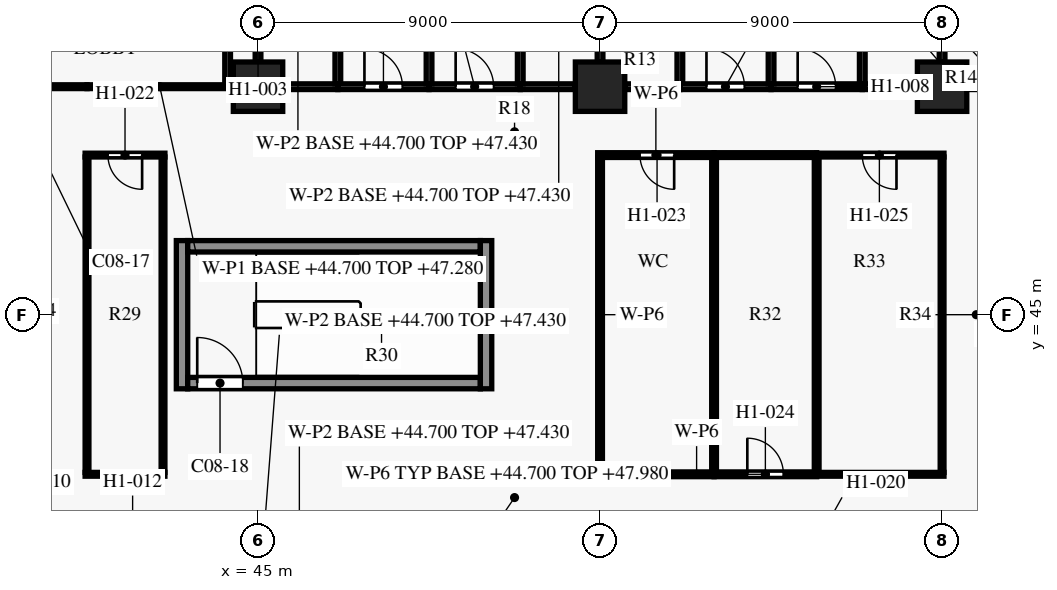
"""IFC4 building model, lengths in metres.
Left out: names, types, materials, properties, quantities, classifications, styles, units other than length and angle.
Written with IfcOpenShell. Run it as: python <this file> out.ifc"""

import sys

from ifc_helpers import new_model, si_unit, direction, frame, frame_2d, origin, origin_2d, place, context, subcontext, project, spatial, rectangle, extrude, element, fill, save


model = new_model("IFC4")
c1 = context("Model", 3, precision=1e-05, world=origin(), true_north=direction((0.0, 1.0)))
c2 = subcontext(c1, "Body", "Model", "MODEL_VIEW")
j1 = project(units=[si_unit("LENGTHUNIT", "METRE"), si_unit("PLANEANGLEUNIT", "RADIAN")], contexts=[c1])
p1 = place(None, origin())
s1 = spatial("IfcSite", under=j1, at=p1, CompositionType="ELEMENT")
p2 = place(p1, origin())
s2 = spatial("IfcBuilding", under=s1, at=p2, CompositionType="ELEMENT")
p3 = place(p2, frame((0.0, 0.0, 44.7)))
s3 = spatial("IfcBuildingStorey", under=s2, at=p3, CompositionType="ELEMENT", Elevation=44.7)
for number, where, z_axis, x_axis in (
    (1, (45.0, 51.0, 0.0), (0.0, 0.0, 1.0), (1.0, 0.0, 0.0)),
    (2, (54.0, 51.0, 0.0), (0.0, 0.0, 1.0), (1.0, 0.0, 0.0)),
    (3, (63.0, 51.0, 0.0), (0.0, 0.0, 1.0), (1.0, 0.0, 0.0)),
):
    element("IfcColumn", number, at=place(p3, frame(where, z_axis=z_axis, x_axis=x_axis)), inside=s3, PredefinedType="COLUMN", context=c2, shape_type="SweptSolid", body=[
        extrude(rectangle(XDim=1.3, YDim=1.3, at=origin_2d()), origin(), (0.0, 0.0, 1.0), 3.6),
    ])
p4 = place(p3, frame((43.15, 43.2, 0.0), z_axis=(0.0, 0.0, 1.0), x_axis=(1.0, 0.0, 0.0)))
e4 = element("IfcWall", 4, at=p4, inside=s3, PredefinedType="SHEAR", context=c2, shape_type="SweptSolid", body=[
    extrude(rectangle(XDim=7.7, YDim=0.3, at=frame_2d((3.85, 0.0))), origin(), (0.0, 0.0, 1.0), 3.3),
])
p5 = place(p4, frame((0.25, 0.0, 0.0)))
e5 = element("IfcOpeningElement", 5, at=p5, cuts=e4, PredefinedType="OPENING", context=c2, shape_type="SweptSolid", body=[
    extrude(rectangle(XDim=1.2, YDim=2.2, at=frame_2d((0.6, 1.1))), frame((0.0, 0.16, 0.0), z_axis=(0.0, -1.0, 0.0), x_axis=(1.0, 0.0, 0.0)), (0.0, 0.0, 1.0), 0.32),
])
p6 = place(p3, frame((43.15, 46.8, 0.0), z_axis=(0.0, 0.0, 1.0), x_axis=(1.0, 0.0, 0.0)))
e6 = element("IfcWall", 6, at=p6, inside=s3, PredefinedType="SHEAR", context=c2, shape_type="SweptSolid", body=[
    extrude(rectangle(XDim=7.7, YDim=0.3, at=frame_2d((3.85, 0.0))), origin(), (0.0, 0.0, 1.0), 3.3),
])
for number, where, z_axis, x_axis in (
    (7, (43.0, 43.05, 0.0), (0.0, 0.0, 1.0), (0.0, 1.0, 0.0)),
    (8, (51.0, 43.05, 0.0), (0.0, 0.0, 1.0), (0.0, 1.0, 0.0)),
):
    element("IfcWall", number, at=place(p3, frame(where, z_axis=z_axis, x_axis=x_axis)), inside=s3, PredefinedType="SHEAR", context=c2, shape_type="SweptSolid", body=[
        extrude(rectangle(XDim=3.9, YDim=0.3, at=frame_2d((1.95, 0.0))), origin(), (0.0, 0.0, 1.0), 3.3),
    ])
p7 = place(p3, frame((40.45, 40.8, 0.0), z_axis=(0.0, 0.0, 1.0), x_axis=(1.0, 0.0, 0.0)))
e9 = element("IfcWall", 9, at=p7, inside=s3, PredefinedType="PARTITIONING", context=c2, shape_type="SweptSolid", body=[
    extrude(rectangle(XDim=2.1, YDim=0.1, at=frame_2d((1.05, 0.0))), origin(), (0.0, 0.0, 1.0), 3.28),
])
p8 = place(p3, frame((53.938, 40.8, 0.0), z_axis=(0.0, 0.0, 1.0), x_axis=(1.0, 0.0, 0.0)))
e10 = element("IfcWall", 10, at=p8, inside=s3, PredefinedType="PARTITIONING", context=c2, shape_type="SweptSolid", body=[
    extrude(rectangle(XDim=3.062, YDim=0.125, at=frame_2d((1.531, 0.0))), origin(), (0.0, 0.0, 1.0), 2.73),
])
p9 = place(p3, frame((57.0, 40.8, 0.0), z_axis=(0.0, 0.0, 1.0), x_axis=(1.0, 0.0, 0.0)))
e11 = element("IfcWall", 11, at=p9, inside=s3, PredefinedType="PARTITIONING", context=c2, shape_type="SweptSolid", body=[
    extrude(rectangle(XDim=2.7, YDim=0.125, at=frame_2d((1.35, 0.0))), origin(), (0.0, 0.0, 1.0), 3.28),
])
p10 = place(p9, frame((0.875, 0.0, 0.0)))
e12 = element("IfcOpeningElement", 12, at=p10, cuts=e11, PredefinedType="OPENING", context=c2, shape_type="SweptSolid", body=[
    extrude(rectangle(XDim=0.95, YDim=2.1, at=frame_2d((0.475, 1.05))), frame((0.0, 0.073, 0.0), z_axis=(0.0, -1.0, 0.0), x_axis=(1.0, 0.0, 0.0)), (0.0, 0.0, 1.0), 0.145),
])
p11 = place(p3, frame((59.7, 40.8, 0.0), z_axis=(0.0, 0.0, 1.0), x_axis=(1.0, 0.0, 0.0)))
e13 = element("IfcWall", 13, at=p11, inside=s3, PredefinedType="PARTITIONING", context=c2, shape_type="SweptSolid", body=[
    extrude(rectangle(XDim=3.35, YDim=0.1, at=frame_2d((1.675, 0.0))), origin(), (0.0, 0.0, 1.0), 2.73),
])
p12 = place(p3, frame((63.0, 40.85, 0.0), z_axis=(0.0, 0.0, 1.0), x_axis=(0.0, 1.0, 0.0)))
e14 = element("IfcWall", 14, at=p12, inside=s3, PredefinedType="PARTITIONING", context=c2, shape_type="SweptSolid", body=[
    extrude(rectangle(XDim=8.3, YDim=0.1, at=frame_2d((4.15, 0.0))), origin(), (0.0, 0.0, 1.0), 2.73),
])
p13 = place(p3, frame((54.0, 49.137, 0.0), z_axis=(0.0, 0.0, 1.0), x_axis=(0.0, -1.0, 0.0)))
e15 = element("IfcWall", 15, at=p13, inside=s3, PredefinedType="PARTITIONING", context=c2, shape_type="SweptSolid", body=[
    extrude(rectangle(XDim=8.275, YDim=0.125, at=frame_2d((4.137, 0.0))), origin(), (0.0, 0.0, 1.0), 2.73),
])
for number, where, z_axis, x_axis in (
    (16, (57.0, 49.137, 0.0), (0.0, 0.0, 1.0), (0.0, -1.0, 0.0)),
    (17, (59.7, 49.137, 0.0), (0.0, 0.0, 1.0), (0.0, -1.0, 0.0)),
):
    element("IfcWall", number, at=place(p3, frame(where, z_axis=z_axis, x_axis=x_axis)), inside=s3, PredefinedType="PARTITIONING", context=c2, shape_type="SweptSolid", body=[
        extrude(rectangle(XDim=8.275, YDim=0.125, at=frame_2d((4.137, 0.0))), origin(), (0.0, 0.0, 1.0), 3.28),
    ])
for number, where, z_axis, x_axis in (
    (18, (40.5, 49.15, 0.0), (0.0, 0.0, 1.0), (0.0, -1.0, 0.0)),
    (19, (42.5, 49.15, 0.0), (0.0, 0.0, 1.0), (0.0, -1.0, 0.0)),
):
    element("IfcWall", number, at=place(p3, frame(where, z_axis=z_axis, x_axis=x_axis)), inside=s3, PredefinedType="PARTITIONING", context=c2, shape_type="SweptSolid", body=[
        extrude(rectangle(XDim=8.3, YDim=0.1, at=frame_2d((4.15, 0.0))), origin(), (0.0, 0.0, 1.0), 3.28),
    ])
p14 = place(p3, frame((42.55, 49.2, 0.0), z_axis=(0.0, 0.0, 1.0), x_axis=(-1.0, 0.0, 0.0)))
e20 = element("IfcWall", 20, at=p14, inside=s3, PredefinedType="PARTITIONING", context=c2, shape_type="SweptSolid", body=[
    extrude(rectangle(XDim=2.1, YDim=0.1, at=frame_2d((1.05, 0.0))), origin(), (0.0, 0.0, 1.0), 3.28),
])
p15 = place(p14, frame((0.6, 0.0, 0.0)))
e21 = element("IfcOpeningElement", 21, at=p15, cuts=e20, PredefinedType="OPENING", context=c2, shape_type="SweptSolid", body=[
    extrude(rectangle(XDim=0.9, YDim=2.1, at=frame_2d((0.45, 1.05))), frame((0.0, 0.06, 0.0), z_axis=(0.0, -1.0, 0.0), x_axis=(1.0, 0.0, 0.0)), (0.0, 0.0, 1.0), 0.12),
])
p16 = place(p3, frame((57.0, 49.2, 0.0), z_axis=(0.0, 0.0, 1.0), x_axis=(-1.0, 0.0, 0.0)))
e22 = element("IfcWall", 22, at=p16, inside=s3, PredefinedType="PARTITIONING", context=c2, shape_type="SweptSolid", body=[
    extrude(rectangle(XDim=3.062, YDim=0.125, at=frame_2d((1.531, 0.0))), origin(), (0.0, 0.0, 1.0), 2.73),
])
p17 = place(p16, frame((1.05, 0.0, 0.0)))
e23 = element("IfcOpeningElement", 23, at=p17, cuts=e22, PredefinedType="OPENING", context=c2, shape_type="SweptSolid", body=[
    extrude(rectangle(XDim=0.9, YDim=2.1, at=frame_2d((0.45, 1.05))), frame((0.0, 0.073, 0.0), z_axis=(0.0, -1.0, 0.0), x_axis=(1.0, 0.0, 0.0)), (0.0, 0.0, 1.0), 0.145),
])
p18 = place(p3, frame((59.7, 49.2, 0.0), z_axis=(0.0, 0.0, 1.0), x_axis=(-1.0, 0.0, 0.0)))
e24 = element("IfcWall", 24, at=p18, inside=s3, PredefinedType="PARTITIONING", context=c2, shape_type="SweptSolid", body=[
    extrude(rectangle(XDim=2.7, YDim=0.125, at=frame_2d((1.35, 0.0))), origin(), (0.0, 0.0, 1.0), 3.28),
])
p19 = place(p3, frame((63.05, 49.2, 0.0), z_axis=(0.0, 0.0, 1.0), x_axis=(-1.0, 0.0, 0.0)))
e25 = element("IfcWall", 25, at=p19, inside=s3, PredefinedType="PARTITIONING", context=c2, shape_type="SweptSolid", body=[
    extrude(rectangle(XDim=3.35, YDim=0.1, at=frame_2d((1.675, 0.0))), origin(), (0.0, 0.0, 1.0), 2.73),
])
p20 = place(p19, frame((1.25, 0.0, 0.0)))
e26 = element("IfcOpeningElement", 26, at=p20, cuts=e25, PredefinedType="OPENING", context=c2, shape_type="SweptSolid", body=[
    extrude(rectangle(XDim=0.9, YDim=2.1, at=frame_2d((0.45, 1.05))), frame((0.0, 0.06, 0.0), z_axis=(0.0, -1.0, 0.0), x_axis=(1.0, 0.0, 0.0)), (0.0, 0.0, 1.0), 0.12),
])
p21 = place(p3, frame((40.5, 51.0, 0.0), z_axis=(0.0, 0.0, 1.0), x_axis=(-1.0, 0.0, 0.0)))
e27 = element("IfcWall", 27, at=p21, inside=s3, PredefinedType="PARTITIONING", context=c2, shape_type="SweptSolid", body=[
    extrude(rectangle(XDim=3.845, YDim=0.1, at=frame_2d((1.922, 0.0))), origin(), (0.0, 0.0, 1.0), 2.58),
])
p22 = place(p21, frame((1.8, 0.0, 0.0)))
e28 = element("IfcOpeningElement", 28, at=p22, cuts=e27, PredefinedType="OPENING", context=c2, shape_type="SweptSolid", body=[
    extrude(rectangle(XDim=0.9, YDim=2.1, at=frame_2d((0.45, 1.05))), frame((0.0, 0.06, 0.0), z_axis=(0.0, -1.0, 0.0), x_axis=(1.0, 0.0, 0.0)), (0.0, 0.0, 1.0), 0.12),
])
p23 = place(p3, frame((44.33, 51.0, 0.0), z_axis=(0.0, 0.0, 1.0), x_axis=(-1.0, 0.0, 0.0)))
e29 = element("IfcWall", 29, at=p23, inside=s3, PredefinedType="PARTITIONING", context=c2, shape_type="SweptSolid", body=[
    extrude(rectangle(XDim=3.83, YDim=0.1, at=frame_2d((1.915, 0.0))), origin(), (0.0, 0.0, 1.0), 2.58),
])
p24 = place(p3, frame((45.655, 51.0, 0.0), z_axis=(0.0, 0.0, 1.0), x_axis=(1.0, 0.0, 0.0)))
e30 = element("IfcWall", 30, at=p24, inside=s3, PredefinedType="PARTITIONING", context=c2, shape_type="SweptSolid", body=[
    extrude(rectangle(XDim=1.445, YDim=0.15, at=frame_2d((0.723, 0.0))), origin(), (0.0, 0.0, 1.0), 2.58),
])
p25 = place(p3, frame((47.1, 51.0, 0.0), z_axis=(0.0, 0.0, 1.0), x_axis=(1.0, 0.0, 0.0)))
e31 = element("IfcWall", 31, at=p25, inside=s3, PredefinedType="PARTITIONING", context=c2, shape_type="SweptSolid", body=[
    extrude(rectangle(XDim=2.4, YDim=0.15, at=frame_2d((1.2, 0.0))), origin(), (0.0, 0.0, 1.0), 2.58),
])
p26 = place(p25, frame((0.7, 0.0, 0.0)))
e32 = element("IfcOpeningElement", 32, at=p26, cuts=e31, PredefinedType="OPENING", context=c2, shape_type="SweptSolid", body=[
    extrude(rectangle(XDim=1.0, YDim=2.1, at=frame_2d((0.5, 1.05))), frame((0.0, 0.085, 0.0), z_axis=(0.0, -1.0, 0.0), x_axis=(1.0, 0.0, 0.0)), (0.0, 0.0, 1.0), 0.17),
])
p27 = place(p3, frame((49.5, 51.0, 0.0), z_axis=(0.0, 0.0, 1.0), x_axis=(1.0, 0.0, 0.0)))
e33 = element("IfcWall", 33, at=p27, inside=s3, PredefinedType="PARTITIONING", context=c2, shape_type="SweptSolid", body=[
    extrude(rectangle(XDim=2.4, YDim=0.15, at=frame_2d((1.2, 0.0))), origin(), (0.0, 0.0, 1.0), 2.58),
])
p28 = place(p27, frame((0.7, 0.0, 0.0)))
e34 = element("IfcOpeningElement", 34, at=p28, cuts=e33, PredefinedType="OPENING", context=c2, shape_type="SweptSolid", body=[
    extrude(rectangle(XDim=1.0, YDim=2.1, at=frame_2d((0.5, 1.05))), frame((0.0, 0.085, 0.0), z_axis=(0.0, -1.0, 0.0), x_axis=(1.0, 0.0, 0.0)), (0.0, 0.0, 1.0), 0.17),
])
for number, where, z_axis, x_axis in (
    (35, (51.9, 51.0, 0.0), (0.0, 0.0, 1.0), (1.0, 0.0, 0.0)),
    (36, (54.655, 51.0, 0.0), (0.0, 0.0, 1.0), (1.0, 0.0, 0.0)),
):
    element("IfcWall", number, at=place(p3, frame(where, z_axis=z_axis, x_axis=x_axis)), inside=s3, PredefinedType="PARTITIONING", context=c2, shape_type="SweptSolid", body=[
        extrude(rectangle(XDim=1.445, YDim=0.15, at=frame_2d((0.723, 0.0))), origin(), (0.0, 0.0, 1.0), 2.58),
    ])
p29 = place(p3, frame((56.1, 51.0, 0.0), z_axis=(0.0, 0.0, 1.0), x_axis=(1.0, 0.0, 0.0)))
e37 = element("IfcWall", 37, at=p29, inside=s3, PredefinedType="PARTITIONING", context=c2, shape_type="SweptSolid", body=[
    extrude(rectangle(XDim=2.4, YDim=0.15, at=frame_2d((1.2, 0.0))), origin(), (0.0, 0.0, 1.0), 2.58),
])
p30 = place(p29, frame((0.7, 0.0, 0.0)))
e38 = element("IfcOpeningElement", 38, at=p30, cuts=e37, PredefinedType="OPENING", context=c2, shape_type="SweptSolid", body=[
    extrude(rectangle(XDim=1.0, YDim=2.1, at=frame_2d((0.5, 1.05))), frame((0.0, 0.085, 0.0), z_axis=(0.0, -1.0, 0.0), x_axis=(1.0, 0.0, 0.0)), (0.0, 0.0, 1.0), 0.17),
])
p31 = place(p3, frame((58.5, 51.0, 0.0), z_axis=(0.0, 0.0, 1.0), x_axis=(1.0, 0.0, 0.0)))
e39 = element("IfcWall", 39, at=p31, inside=s3, PredefinedType="PARTITIONING", context=c2, shape_type="SweptSolid", body=[
    extrude(rectangle(XDim=2.4, YDim=0.15, at=frame_2d((1.2, 0.0))), origin(), (0.0, 0.0, 1.0), 2.58),
])
p32 = place(p31, frame((0.7, 0.0, 0.0)))
e40 = element("IfcOpeningElement", 40, at=p32, cuts=e39, PredefinedType="OPENING", context=c2, shape_type="SweptSolid", body=[
    extrude(rectangle(XDim=1.0, YDim=2.1, at=frame_2d((0.5, 1.05))), frame((0.0, 0.085, 0.0), z_axis=(0.0, -1.0, 0.0), x_axis=(1.0, 0.0, 0.0)), (0.0, 0.0, 1.0), 0.17),
])
p33 = place(p3, frame((60.9, 51.0, 0.0), z_axis=(0.0, 0.0, 1.0), x_axis=(1.0, 0.0, 0.0)))
e41 = element("IfcWall", 41, at=p33, inside=s3, PredefinedType="PARTITIONING", context=c2, shape_type="SweptSolid", body=[
    extrude(rectangle(XDim=1.445, YDim=0.15, at=frame_2d((0.723, 0.0))), origin(), (0.0, 0.0, 1.0), 2.58),
])
p34 = place(p3, frame((63.655, 51.0, 0.0), z_axis=(0.0, 0.0, 1.0), x_axis=(1.0, 0.0, 0.0)))
e42 = element("IfcWall", 42, at=p34, inside=s3, PredefinedType="PARTITIONING", context=c2, shape_type="SweptSolid", body=[
    extrude(rectangle(XDim=1.22, YDim=0.15, at=frame_2d((0.61, 0.0))), origin(), (0.0, 0.0, 1.0), 2.58),
])
p35 = place(p3, frame((47.1, 51.075, 0.0), z_axis=(0.0, 0.0, 1.0), x_axis=(0.0, 1.0, 0.0)))
e43 = element("IfcWall", 43, at=p35, inside=s3, PredefinedType="PARTITIONING", context=c2, shape_type="SweptSolid", body=[
    extrude(rectangle(XDim=2.85, YDim=0.15, at=frame_2d((1.425, 0.0))), origin(), (0.0, 0.0, 1.0), 2.58),
])
p36 = place(p3, frame((56.1, 51.075, 0.0), z_axis=(0.0, 0.0, 1.0), x_axis=(0.0, 1.0, 0.0)))
e44 = element("IfcWall", 44, at=p36, inside=s3, PredefinedType="PARTITIONING", context=c2, shape_type="SweptSolid", body=[
    extrude(rectangle(XDim=2.85, YDim=0.15, at=frame_2d((1.425, 0.0))), origin(), (0.0, 0.0, 1.0), 2.58),
])
p37 = place(p36, frame((1.025, 0.0, 0.0)))
e45 = element("IfcOpeningElement", 45, at=p37, cuts=e44, PredefinedType="OPENING", context=c2, shape_type="SweptSolid", body=[
    extrude(rectangle(XDim=0.8, YDim=2.1, at=frame_2d((0.4, 1.05))), frame((0.0, 0.085, 0.0), z_axis=(0.0, -1.0, 0.0), x_axis=(1.0, 0.0, 0.0)), (0.0, 0.0, 1.0), 0.17),
])
p38 = place(p3, frame((44.2, 53.7, 0.0), z_axis=(0.0, 0.0, 1.0), x_axis=(0.0, -1.0, 0.0)))
e46 = element("IfcWall", 46, at=p38, inside=s3, PredefinedType="PARTITIONING", context=c2, shape_type="SweptSolid", body=[
    extrude(rectangle(XDim=2.625, YDim=0.15, at=frame_2d((1.312, 0.0))), origin(), (0.0, 0.0, 1.0), 2.58),
])
p39 = place(p3, frame((45.0, 53.925, 0.0), z_axis=(0.0, 0.0, 1.0), x_axis=(0.0, -1.0, 0.0)))
e47 = element("IfcWall", 47, at=p39, inside=s3, PredefinedType="PARTITIONING", context=c2, shape_type="SweptSolid", body=[
    extrude(rectangle(XDim=2.27, YDim=0.15, at=frame_2d((1.135, 0.0))), origin(), (0.0, 0.0, 1.0), 2.73),
])
p40 = place(p39, frame((1.025, 0.0, 0.0)))
e48 = element("IfcOpeningElement", 48, at=p40, cuts=e47, PredefinedType="OPENING", context=c2, shape_type="SweptSolid", body=[
    extrude(rectangle(XDim=0.8, YDim=2.1, at=frame_2d((0.4, 1.05))), frame((0.0, 0.085, 0.0), z_axis=(0.0, -1.0, 0.0), x_axis=(1.0, 0.0, 0.0)), (0.0, 0.0, 1.0), 0.17),
])
p41 = place(p3, frame((51.9, 53.925, 0.0), z_axis=(0.0, 0.0, 1.0), x_axis=(0.0, -1.0, 0.0)))
e49 = element("IfcWall", 49, at=p41, inside=s3, PredefinedType="PARTITIONING", context=c2, shape_type="SweptSolid", body=[
    extrude(rectangle(XDim=2.85, YDim=0.15, at=frame_2d((1.425, 0.0))), origin(), (0.0, 0.0, 1.0), 2.58),
])
p42 = place(p41, frame((1.025, 0.0, 0.0)))
e50 = element("IfcOpeningElement", 50, at=p42, cuts=e49, PredefinedType="OPENING", context=c2, shape_type="SweptSolid", body=[
    extrude(rectangle(XDim=0.8, YDim=2.1, at=frame_2d((0.4, 1.05))), frame((0.0, 0.085, 0.0), z_axis=(0.0, -1.0, 0.0), x_axis=(1.0, 0.0, 0.0)), (0.0, 0.0, 1.0), 0.17),
])
p43 = place(p3, frame((54.0, 53.925, 0.0), z_axis=(0.0, 0.0, 1.0), x_axis=(0.0, -1.0, 0.0)))
e51 = element("IfcWall", 51, at=p43, inside=s3, PredefinedType="PARTITIONING", context=c2, shape_type="SweptSolid", body=[
    extrude(rectangle(XDim=2.27, YDim=0.15, at=frame_2d((1.135, 0.0))), origin(), (0.0, 0.0, 1.0), 2.73),
])
p44 = place(p3, frame((60.9, 53.925, 0.0), z_axis=(0.0, 0.0, 1.0), x_axis=(0.0, -1.0, 0.0)))
e52 = element("IfcWall", 52, at=p44, inside=s3, PredefinedType="PARTITIONING", context=c2, shape_type="SweptSolid", body=[
    extrude(rectangle(XDim=2.85, YDim=0.15, at=frame_2d((1.425, 0.0))), origin(), (0.0, 0.0, 1.0), 2.58),
])
p45 = place(p44, frame((1.025, 0.0, 0.0)))
e53 = element("IfcOpeningElement", 53, at=p45, cuts=e52, PredefinedType="OPENING", context=c2, shape_type="SweptSolid", body=[
    extrude(rectangle(XDim=0.8, YDim=2.1, at=frame_2d((0.4, 1.05))), frame((0.0, 0.085, 0.0), z_axis=(0.0, -1.0, 0.0), x_axis=(1.0, 0.0, 0.0)), (0.0, 0.0, 1.0), 0.17),
])
p46 = place(p3, frame((63.0, 53.925, 0.0), z_axis=(0.0, 0.0, 1.0), x_axis=(0.0, -1.0, 0.0)))
e54 = element("IfcWall", 54, at=p46, inside=s3, PredefinedType="PARTITIONING", context=c2, shape_type="SweptSolid", body=[
    extrude(rectangle(XDim=2.27, YDim=0.15, at=frame_2d((1.135, 0.0))), origin(), (0.0, 0.0, 1.0), 2.73),
])
for number, where, z_axis, x_axis in (
    (55, (49.5, 62.425, 0.0), (0.0, 0.0, 1.0), (0.0, -1.0, 0.0)),
    (56, (58.5, 62.425, 0.0), (0.0, 0.0, 1.0), (0.0, -1.0, 0.0)),
):
    element("IfcWall", number, at=place(p3, frame(where, z_axis=z_axis, x_axis=x_axis)), inside=s3, PredefinedType="PARTITIONING", context=c2, shape_type="SweptSolid", body=[
        extrude(rectangle(XDim=11.35, YDim=0.15, at=frame_2d((5.675, 0.0))), origin(), (0.0, 0.0, 1.0), 2.58),
    ])
p47 = place(p5, origin())
e57 = element("IfcDoor", 57, at=p47, inside=s3, OperationType="SINGLE_SWING_RIGHT", PredefinedType="DOOR", context=c2, shape_type="SweptSolid", body=[
    extrude(rectangle(XDim=1.2, YDim=2.2, at=frame_2d((0.6, 1.1))), frame((0.0, 0.025, 0.0), z_axis=(0.0, -1.0, 0.0), x_axis=(1.0, 0.0, 0.0)), (0.0, 0.0, 1.0), 0.05),
])
fill(e5, e57)
p48 = place(p26, origin())
e58 = element("IfcDoor", 58, at=p48, inside=s3, OperationType="SINGLE_SWING_LEFT", PredefinedType="DOOR", context=c2, shape_type="SweptSolid", body=[
    extrude(rectangle(XDim=1.0, YDim=2.1, at=frame_2d((0.5, 1.05))), frame((0.0, 0.025, 0.0), z_axis=(0.0, -1.0, 0.0), x_axis=(1.0, 0.0, 0.0)), (0.0, 0.0, 1.0), 0.05),
])
fill(e32, e58)
p49 = place(p28, origin())
e59 = element("IfcDoor", 59, at=p49, inside=s3, OperationType="SINGLE_SWING_LEFT", PredefinedType="DOOR", context=c2, shape_type="SweptSolid", body=[
    extrude(rectangle(XDim=1.0, YDim=2.1, at=frame_2d((0.5, 1.05))), frame((0.0, 0.025, 0.0), z_axis=(0.0, -1.0, 0.0), x_axis=(1.0, 0.0, 0.0)), (0.0, 0.0, 1.0), 0.05),
])
fill(e34, e59)
p50 = place(p30, origin())
e60 = element("IfcDoor", 60, at=p50, inside=s3, OperationType="SINGLE_SWING_LEFT", PredefinedType="DOOR", context=c2, shape_type="SweptSolid", body=[
    extrude(rectangle(XDim=1.0, YDim=2.1, at=frame_2d((0.5, 1.05))), frame((0.0, 0.025, 0.0), z_axis=(0.0, -1.0, 0.0), x_axis=(1.0, 0.0, 0.0)), (0.0, 0.0, 1.0), 0.05),
])
fill(e38, e60)
p51 = place(p32, origin())
e61 = element("IfcDoor", 61, at=p51, inside=s3, OperationType="SINGLE_SWING_LEFT", PredefinedType="DOOR", context=c2, shape_type="SweptSolid", body=[
    extrude(rectangle(XDim=1.0, YDim=2.1, at=frame_2d((0.5, 1.05))), frame((0.0, 0.025, 0.0), z_axis=(0.0, -1.0, 0.0), x_axis=(1.0, 0.0, 0.0)), (0.0, 0.0, 1.0), 0.05),
])
fill(e40, e61)
p52 = place(p15, origin())
e62 = element("IfcDoor", 62, at=p52, inside=s3, OperationType="SINGLE_SWING_LEFT", PredefinedType="DOOR", context=c2, shape_type="SweptSolid", body=[
    extrude(rectangle(XDim=0.9, YDim=2.1, at=frame_2d((0.45, 1.05))), frame((0.0, 0.025, 0.0), z_axis=(0.0, -1.0, 0.0), x_axis=(1.0, 0.0, 0.0)), (0.0, 0.0, 1.0), 0.05),
])
fill(e21, e62)
p53 = place(p17, origin())
e63 = element("IfcDoor", 63, at=p53, inside=s3, OperationType="SINGLE_SWING_LEFT", PredefinedType="DOOR", context=c2, shape_type="SweptSolid", body=[
    extrude(rectangle(XDim=0.9, YDim=2.1, at=frame_2d((0.45, 1.05))), frame((0.0, 0.025, 0.0), z_axis=(0.0, -1.0, 0.0), x_axis=(1.0, 0.0, 0.0)), (0.0, 0.0, 1.0), 0.05),
])
fill(e23, e63)
p54 = place(p10, origin())
e64 = element("IfcDoor", 64, at=p54, inside=s3, OperationType="SINGLE_SWING_LEFT", PredefinedType="DOOR", context=c2, shape_type="SweptSolid", body=[
    extrude(rectangle(XDim=0.95, YDim=2.1, at=frame_2d((0.475, 1.05))), frame((0.0, 0.025, 0.0), z_axis=(0.0, -1.0, 0.0), x_axis=(1.0, 0.0, 0.0)), (0.0, 0.0, 1.0), 0.05),
])
fill(e12, e64)
p55 = place(p20, origin())
e65 = element("IfcDoor", 65, at=p55, inside=s3, OperationType="SINGLE_SWING_LEFT", PredefinedType="DOOR", context=c2, shape_type="SweptSolid", body=[
    extrude(rectangle(XDim=0.9, YDim=2.1, at=frame_2d((0.45, 1.05))), frame((0.0, 0.025, 0.0), z_axis=(0.0, -1.0, 0.0), x_axis=(1.0, 0.0, 0.0)), (0.0, 0.0, 1.0), 0.05),
])
fill(e26, e65)
save(model, sys.argv[1])
